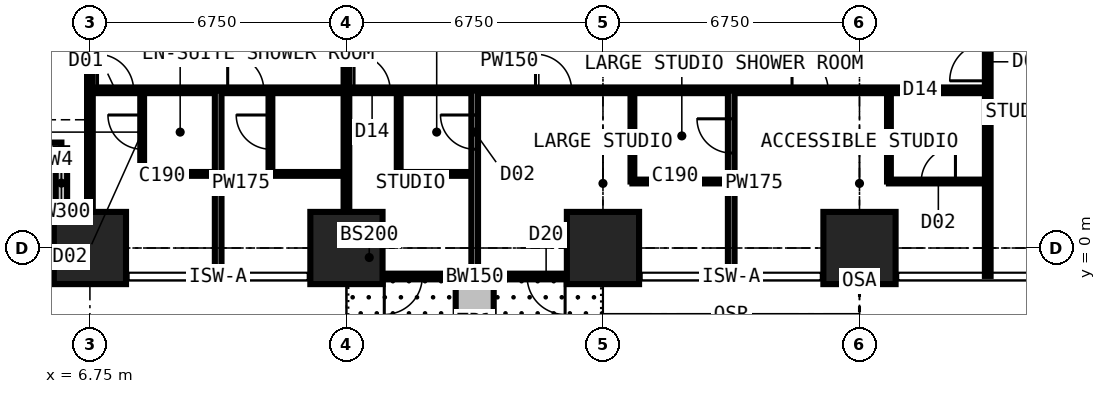
"""IFC4 building model, lengths in metres.
Left out: names, types, materials, properties, quantities, classifications, styles, units other than length and angle.
Written with IfcOpenShell. Run it as: python <this file> out.ifc"""

import sys

from ifc_helpers import new_model, si_unit, direction, frame, frame_2d, origin, origin_2d, place, context, subcontext, project, spatial, rectangle, extrude, element, fill, save


model = new_model("IFC4")
c1 = context("Model", 3, precision=1e-05, world=origin(), true_north=direction((0.0, 1.0)))
c2 = subcontext(c1, "Body", "Model", "MODEL_VIEW")
j1 = project(units=[si_unit("LENGTHUNIT", "METRE"), si_unit("PLANEANGLEUNIT", "RADIAN")], contexts=[c1])
p1 = place(None, origin())
s1 = spatial("IfcSite", under=j1, at=p1, CompositionType="ELEMENT")
p2 = place(p1, origin())
s2 = spatial("IfcBuilding", under=s1, at=p2, CompositionType="ELEMENT")
p3 = place(p2, frame((0.0, 0.0, 25.2)))
s3 = spatial("IfcBuildingStorey", under=s2, at=p3, CompositionType="ELEMENT", Elevation=25.2)
for number, where, z_axis, x_axis in (
    (1, (6.75, 0.0, 0.0), (0.0, 0.0, 1.0), (1.0, 0.0, 0.0)),
    (2, (13.5, 0.0, 0.0), (0.0, 0.0, 1.0), (1.0, 0.0, 0.0)),
    (3, (20.25, 0.0, 0.0), (0.0, 0.0, 1.0), (1.0, 0.0, 0.0)),
    (4, (27.0, 0.0, 0.0), (0.0, 0.0, 1.0), (1.0, 0.0, 0.0)),
):
    element("IfcColumn", number, at=place(p3, frame(where, z_axis=z_axis, x_axis=x_axis)), inside=s3, PredefinedType="COLUMN", context=c2, shape_type="SweptSolid", body=[
        extrude(rectangle(XDim=1.9, YDim=1.9, at=origin_2d()), origin(), (0.0, 0.0, 1.0), 3.6),
    ])
p4 = place(p3, frame((2.625, 2.625, 0.0), z_axis=(0.0, 0.0, 1.0), x_axis=(1.0, 0.0, 0.0)))
e5 = element("IfcWall", 5, at=p4, inside=s3, PredefinedType="SOLIDWALL", context=c2, shape_type="SweptSolid", body=[
    extrude(rectangle(XDim=3.375, YDim=0.3, at=frame_2d((1.688, 0.0))), origin(), (0.0, 0.0, 1.0), 3.375),
])
p5 = place(p4, frame((0.788, 0.0, 0.6)))
e6 = element("IfcOpeningElement", 6, at=p5, cuts=e5, PredefinedType="OPENING", context=c2, shape_type="SweptSolid", body=[
    extrude(rectangle(XDim=1.8, YDim=2.1, at=frame_2d((0.9, 1.05))), frame((0.0, 0.16, 0.0), z_axis=(0.0, -1.0, 0.0), x_axis=(1.0, 0.0, 0.0)), (0.0, 0.0, 1.0), 0.32),
])
p6 = place(p3, frame((6.0, 2.625, 0.0), z_axis=(0.0, 0.0, 1.0), x_axis=(0.0, -1.0, 0.0)))
e7 = element("IfcWall", 7, at=p6, inside=s3, PredefinedType="SOLIDWALL", context=c2, shape_type="SweptSolid", body=[
    extrude(rectangle(XDim=3.375, YDim=0.3, at=frame_2d((1.688, 0.0))), origin(), (0.0, 0.0, 1.0), 3.375),
])
p7 = place(p6, frame((0.317, 0.0, 0.9)))
e8 = element("IfcOpeningElement", 8, at=p7, cuts=e7, PredefinedType="OPENING", context=c2, shape_type="SweptSolid", body=[
    extrude(rectangle(XDim=1.2, YDim=1.8, at=frame_2d((0.6, 0.9))), frame((0.0, 0.16, 0.0), z_axis=(0.0, -1.0, 0.0), x_axis=(1.0, 0.0, 0.0)), (0.0, 0.0, 1.0), 0.32),
])
p8 = place(p3, frame((20.25, -0.75, 0.0), z_axis=(0.0, 0.0, 1.0), x_axis=(-1.0, 0.0, 0.0)))
e9 = element("IfcWall", 9, at=p8, inside=s3, PredefinedType="SOLIDWALL", context=c2, shape_type="SweptSolid", body=[
    extrude(rectangle(XDim=6.75, YDim=0.15, at=frame_2d((3.375, 0.0))), origin(), (0.0, 0.0, 1.0), 3.375),
])
p9 = place(p8, frame((0.996, 0.0, 0.0)))
e10 = element("IfcOpeningElement", 10, at=p9, cuts=e9, PredefinedType="OPENING", context=c2, shape_type="SweptSolid", body=[
    extrude(rectangle(XDim=1.0, YDim=2.2, at=frame_2d((0.5, 1.1))), frame((0.0, 0.085, 0.0), z_axis=(0.0, -1.0, 0.0), x_axis=(1.0, 0.0, 0.0)), (0.0, 0.0, 1.0), 0.17),
])
p10 = place(p8, frame((2.042, 0.0, 0.9)))
e11 = element("IfcOpeningElement", 11, at=p10, cuts=e9, PredefinedType="OPENING", context=c2, shape_type="SweptSolid", body=[
    extrude(rectangle(XDim=1.2, YDim=1.8, at=frame_2d((0.6, 0.9))), frame((0.0, 0.085, 0.0), z_axis=(0.0, -1.0, 0.0), x_axis=(1.0, 0.0, 0.0)), (0.0, 0.0, 1.0), 0.17),
])
p11 = place(p8, frame((4.754, 0.0, 0.0)))
e12 = element("IfcOpeningElement", 12, at=p11, cuts=e9, PredefinedType="OPENING", context=c2, shape_type="SweptSolid", body=[
    extrude(rectangle(XDim=1.0, YDim=2.2, at=frame_2d((0.5, 1.1))), frame((0.0, 0.085, 0.0), z_axis=(0.0, -1.0, 0.0), x_axis=(1.0, 0.0, 0.0)), (0.0, 0.0, 1.0), 0.17),
])
p12 = place(p8, frame((3.508, 0.0, 0.9)))
e13 = element("IfcOpeningElement", 13, at=p12, cuts=e9, PredefinedType="OPENING", context=c2, shape_type="SweptSolid", body=[
    extrude(rectangle(XDim=1.2, YDim=1.8, at=frame_2d((0.6, 0.9))), frame((0.0, 0.085, 0.0), z_axis=(0.0, -1.0, 0.0), x_axis=(1.0, 0.0, 0.0)), (0.0, 0.0, 1.0), 0.17),
])
p13 = place(p3, frame((16.875, -0.85, 0.0), z_axis=(0.0, 0.0, 1.0), x_axis=(0.0, -1.0, 0.0)))
e14 = element("IfcWall", 14, at=p13, inside=s3, PredefinedType="USERDEFINED", context=c2, shape_type="SweptSolid", body=[
    extrude(rectangle(XDim=2.2, YDim=1.0, at=frame_2d((1.1, 0.0))), origin(), (0.0, 0.0, 1.0), 0.9),
])
p14 = place(p3, frame((6.75, -0.734, 0.0), z_axis=(0.0, 0.0, 1.0), x_axis=(0.0, 1.0, 0.0)))
e15 = element("IfcWall", 15, at=p14, inside=s3, PredefinedType="PARTITIONING", context=c2, shape_type="SweptSolid", body=[
    extrude(rectangle(XDim=10.859, YDim=0.15, at=frame_2d((5.429, 0.0))), origin(), (0.0, 0.0, 1.0), 2.877),
])
p15 = place(p3, frame((6.75, 4.15, 0.0), z_axis=(0.0, 0.0, 1.0), x_axis=(1.0, 0.0, 0.0)))
e16 = element("IfcWall", 16, at=p15, inside=s3, PredefinedType="PARTITIONING", context=c2, shape_type="SweptSolid", body=[
    extrude(rectangle(XDim=23.625, YDim=0.15, at=frame_2d((11.812, 0.0))), origin(), (0.0, 0.0, 1.0), 3.375),
])
p16 = place(p15, frame((0.2, 0.0, 0.0)))
e17 = element("IfcOpeningElement", 17, at=p16, cuts=e16, PredefinedType="OPENING", context=c2, shape_type="SweptSolid", body=[
    extrude(rectangle(XDim=0.95, YDim=2.2, at=frame_2d((0.475, 1.1))), frame((0.0, 0.085, 0.0), z_axis=(0.0, -1.0, 0.0), x_axis=(1.0, 0.0, 0.0)), (0.0, 0.0, 1.0), 0.17),
])
p17 = place(p15, frame((3.625, 0.0, 0.0)))
e18 = element("IfcOpeningElement", 18, at=p17, cuts=e16, PredefinedType="OPENING", context=c2, shape_type="SweptSolid", body=[
    extrude(rectangle(XDim=0.95, YDim=2.2, at=frame_2d((0.475, 1.1))), frame((0.0, 0.085, 0.0), z_axis=(0.0, -1.0, 0.0), x_axis=(1.0, 0.0, 0.0)), (0.0, 0.0, 1.0), 0.17),
])
p18 = place(p15, frame((18.475, 0.0, 0.0)))
e19 = element("IfcOpeningElement", 19, at=p18, cuts=e16, PredefinedType="OPENING", context=c2, shape_type="SweptSolid", body=[
    extrude(rectangle(XDim=0.95, YDim=2.2, at=frame_2d((0.475, 1.1))), frame((0.0, 0.085, 0.0), z_axis=(0.0, -1.0, 0.0), x_axis=(1.0, 0.0, 0.0)), (0.0, 0.0, 1.0), 0.17),
])
p19 = place(p15, frame((11.725, 0.0, 0.0)))
e20 = element("IfcOpeningElement", 20, at=p19, cuts=e16, PredefinedType="OPENING", context=c2, shape_type="SweptSolid", body=[
    extrude(rectangle(XDim=0.95, YDim=2.2, at=frame_2d((0.475, 1.1))), frame((0.0, 0.085, 0.0), z_axis=(0.0, -1.0, 0.0), x_axis=(1.0, 0.0, 0.0)), (0.0, 0.0, 1.0), 0.17),
])
p20 = place(p15, frame((6.95, 0.0, 0.0)))
e21 = element("IfcOpeningElement", 21, at=p20, cuts=e16, PredefinedType="OPENING", context=c2, shape_type="SweptSolid", body=[
    extrude(rectangle(XDim=0.95, YDim=2.2, at=frame_2d((0.475, 1.1))), frame((0.0, 0.085, 0.0), z_axis=(0.0, -1.0, 0.0), x_axis=(1.0, 0.0, 0.0)), (0.0, 0.0, 1.0), 0.17),
])
p21 = place(p3, frame((8.125, 1.95, 0.0), z_axis=(0.0, 0.0, 1.0), x_axis=(0.0, 1.0, 0.0)))
e22 = element("IfcWall", 22, at=p21, inside=s3, PredefinedType="PARTITIONING", context=c2, shape_type="SweptSolid", body=[
    extrude(rectangle(XDim=2.2, YDim=0.1, at=frame_2d((1.1, 0.0))), origin(), (0.0, 0.0, 1.0), 3.375),
])
p22 = place(p21, frame((0.65, 0.0, 0.0)))
e23 = element("IfcOpeningElement", 23, at=p22, cuts=e22, PredefinedType="OPENING", context=c2, shape_type="SweptSolid", body=[
    extrude(rectangle(XDim=0.9, YDim=2.2, at=frame_2d((0.45, 1.1))), frame((0.0, 0.06, 0.0), z_axis=(0.0, -1.0, 0.0), x_axis=(1.0, 0.0, 0.0)), (0.0, 0.0, 1.0), 0.12),
])
p23 = place(p3, frame((8.125, 1.95, 0.0), z_axis=(0.0, 0.0, 1.0), x_axis=(1.0, 0.0, 0.0)))
e24 = element("IfcWall", 24, at=p23, inside=s3, PredefinedType="PARTITIONING", context=c2, shape_type="SweptSolid", body=[
    extrude(rectangle(XDim=2.0, YDim=0.1, at=frame_2d((1.0, 0.0))), origin(), (0.0, 0.0, 1.0), 3.375),
])
p24 = place(p3, frame((10.125, -0.734, 0.0), z_axis=(0.0, 0.0, 1.0), x_axis=(0.0, 1.0, 0.0)))
e25 = element("IfcWall", 25, at=p24, inside=s3, PredefinedType="PARTITIONING", context=c2, shape_type="SweptSolid", body=[
    extrude(rectangle(XDim=4.884, YDim=0.175, at=frame_2d((2.442, 0.0))), origin(), (0.0, 0.0, 1.0), 3.375),
])
p25 = place(p3, frame((11.5, 1.95, 0.0), z_axis=(0.0, 0.0, 1.0), x_axis=(0.0, 1.0, 0.0)))
e26 = element("IfcWall", 26, at=p25, inside=s3, PredefinedType="PARTITIONING", context=c2, shape_type="SweptSolid", body=[
    extrude(rectangle(XDim=2.2, YDim=0.1, at=frame_2d((1.1, 0.0))), origin(), (0.0, 0.0, 1.0), 3.375),
])
p26 = place(p25, frame((0.65, 0.0, 0.0)))
e27 = element("IfcOpeningElement", 27, at=p26, cuts=e26, PredefinedType="OPENING", context=c2, shape_type="SweptSolid", body=[
    extrude(rectangle(XDim=0.9, YDim=2.2, at=frame_2d((0.45, 1.1))), frame((0.0, 0.06, 0.0), z_axis=(0.0, -1.0, 0.0), x_axis=(1.0, 0.0, 0.0)), (0.0, 0.0, 1.0), 0.12),
])
p27 = place(p3, frame((11.5, 1.95, 0.0), z_axis=(0.0, 0.0, 1.0), x_axis=(1.0, 0.0, 0.0)))
e28 = element("IfcWall", 28, at=p27, inside=s3, PredefinedType="PARTITIONING", context=c2, shape_type="SweptSolid", body=[
    extrude(rectangle(XDim=2.0, YDim=0.1, at=frame_2d((1.0, 0.0))), origin(), (0.0, 0.0, 1.0), 3.375),
])
p28 = place(p3, frame((13.5, -0.734, 0.0), z_axis=(0.0, 0.0, 1.0), x_axis=(0.0, 1.0, 0.0)))
e29 = element("IfcWall", 29, at=p28, inside=s3, PredefinedType="PARTITIONING", context=c2, shape_type="SweptSolid", body=[
    extrude(rectangle(XDim=12.034, YDim=0.15, at=frame_2d((6.017, 0.0))), origin(), (0.0, 0.0, 1.0), 2.877),
])
p29 = place(p3, frame((14.875, 1.95, 0.0), z_axis=(0.0, 0.0, 1.0), x_axis=(0.0, 1.0, 0.0)))
e30 = element("IfcWall", 30, at=p29, inside=s3, PredefinedType="PARTITIONING", context=c2, shape_type="SweptSolid", body=[
    extrude(rectangle(XDim=2.2, YDim=0.1, at=frame_2d((1.1, 0.0))), origin(), (0.0, 0.0, 1.0), 3.375),
])
p30 = place(p3, frame((14.875, 1.95, 0.0), z_axis=(0.0, 0.0, 1.0), x_axis=(1.0, 0.0, 0.0)))
e31 = element("IfcWall", 31, at=p30, inside=s3, PredefinedType="PARTITIONING", context=c2, shape_type="SweptSolid", body=[
    extrude(rectangle(XDim=2.0, YDim=0.1, at=frame_2d((1.0, 0.0))), origin(), (0.0, 0.0, 1.0), 3.375),
])
p31 = place(p3, frame((16.875, -0.734, 0.0), z_axis=(0.0, 0.0, 1.0), x_axis=(0.0, 1.0, 0.0)))
e32 = element("IfcWall", 32, at=p31, inside=s3, PredefinedType="PARTITIONING", context=c2, shape_type="SweptSolid", body=[
    extrude(rectangle(XDim=4.884, YDim=0.175, at=frame_2d((2.442, 0.0))), origin(), (0.0, 0.0, 1.0), 3.375),
])
p32 = place(p31, frame((3.334, 0.0, 0.0)))
e33 = element("IfcOpeningElement", 33, at=p32, cuts=e32, PredefinedType="OPENING", context=c2, shape_type="SweptSolid", body=[
    extrude(rectangle(XDim=0.9, YDim=2.2, at=frame_2d((0.45, 1.1))), frame((0.0, 0.097, 0.0), z_axis=(0.0, -1.0, 0.0), x_axis=(1.0, 0.0, 0.0)), (0.0, 0.0, 1.0), 0.195),
])
p33 = place(p3, frame((21.025, 1.75, 0.0), z_axis=(0.0, 0.0, 1.0), x_axis=(0.0, 1.0, 0.0)))
e34 = element("IfcWall", 34, at=p33, inside=s3, PredefinedType="PARTITIONING", context=c2, shape_type="SweptSolid", body=[
    extrude(rectangle(XDim=2.4, YDim=0.1, at=frame_2d((1.2, 0.0))), origin(), (0.0, 0.0, 1.0), 3.375),
])
p34 = place(p3, frame((21.025, 1.75, 0.0), z_axis=(0.0, 0.0, 1.0), x_axis=(1.0, 0.0, 0.0)))
e35 = element("IfcWall", 35, at=p34, inside=s3, PredefinedType="PARTITIONING", context=c2, shape_type="SweptSolid", body=[
    extrude(rectangle(XDim=2.6, YDim=0.1, at=frame_2d((1.3, 0.0))), origin(), (0.0, 0.0, 1.0), 3.375),
])
p35 = place(p3, frame((23.625, -0.734, 0.0), z_axis=(0.0, 0.0, 1.0), x_axis=(0.0, 1.0, 0.0)))
e36 = element("IfcWall", 36, at=p35, inside=s3, PredefinedType="PARTITIONING", context=c2, shape_type="SweptSolid", body=[
    extrude(rectangle(XDim=4.884, YDim=0.175, at=frame_2d((2.442, 0.0))), origin(), (0.0, 0.0, 1.0), 3.375),
])
p36 = place(p35, frame((3.234, 0.0, 0.0)))
e37 = element("IfcOpeningElement", 37, at=p36, cuts=e36, PredefinedType="OPENING", context=c2, shape_type="SweptSolid", body=[
    extrude(rectangle(XDim=0.9, YDim=2.2, at=frame_2d((0.45, 1.1))), frame((0.0, 0.097, 0.0), z_axis=(0.0, -1.0, 0.0), x_axis=(1.0, 0.0, 0.0)), (0.0, 0.0, 1.0), 0.195),
])
p37 = place(p3, frame((27.775, 1.75, 0.0), z_axis=(0.0, 0.0, 1.0), x_axis=(0.0, 1.0, 0.0)))
e38 = element("IfcWall", 38, at=p37, inside=s3, PredefinedType="PARTITIONING", context=c2, shape_type="SweptSolid", body=[
    extrude(rectangle(XDim=2.4, YDim=0.1, at=frame_2d((1.2, 0.0))), origin(), (0.0, 0.0, 1.0), 3.375),
])
p38 = place(p3, frame((27.775, 1.75, 0.0), z_axis=(0.0, 0.0, 1.0), x_axis=(1.0, 0.0, 0.0)))
e39 = element("IfcWall", 39, at=p38, inside=s3, PredefinedType="PARTITIONING", context=c2, shape_type="SweptSolid", body=[
    extrude(rectangle(XDim=2.6, YDim=0.1, at=frame_2d((1.3, 0.0))), origin(), (0.0, 0.0, 1.0), 3.375),
])
p39 = place(p38, frame((0.85, 0.0, 0.0)))
e40 = element("IfcOpeningElement", 40, at=p39, cuts=e39, PredefinedType="OPENING", context=c2, shape_type="SweptSolid", body=[
    extrude(rectangle(XDim=0.9, YDim=2.2, at=frame_2d((0.45, 1.1))), frame((0.0, 0.06, 0.0), z_axis=(0.0, -1.0, 0.0), x_axis=(1.0, 0.0, 0.0)), (0.0, 0.0, 1.0), 0.12),
])
p40 = place(p3, frame((30.375, -0.734, 0.0), z_axis=(0.0, 0.0, 1.0), x_axis=(0.0, 1.0, 0.0)))
e41 = element("IfcWall", 41, at=p40, inside=s3, PredefinedType="PARTITIONING", context=c2, shape_type="SweptSolid", body=[
    extrude(rectangle(XDim=12.034, YDim=0.15, at=frame_2d((6.017, 0.0))), origin(), (0.0, 0.0, 1.0), 3.375),
])
p41 = place(p40, frame((5.134, 0.0, 0.0)))
e42 = element("IfcOpeningElement", 42, at=p41, cuts=e41, PredefinedType="OPENING", context=c2, shape_type="SweptSolid", body=[
    extrude(rectangle(XDim=1.0, YDim=2.2, at=frame_2d((0.5, 1.1))), frame((0.0, 0.085, 0.0), z_axis=(0.0, -1.0, 0.0), x_axis=(1.0, 0.0, 0.0)), (0.0, 0.0, 1.0), 0.17),
])
p42 = place(p7, origin())
e43 = element("IfcWindow", 43, at=p42, inside=s3, PartitioningType="SINGLE_PANEL", PredefinedType="WINDOW", context=c2, shape_type="SweptSolid", body=[
    extrude(rectangle(XDim=1.2, YDim=1.8, at=frame_2d((0.6, 0.9))), frame((0.0, 0.03, 0.0), z_axis=(0.0, -1.0, 0.0), x_axis=(1.0, 0.0, 0.0)), (0.0, 0.0, 1.0), 0.06),
])
fill(e8, e43)
p43 = place(p9, origin())
e44 = element("IfcDoor", 44, at=p43, inside=s3, OperationType="SINGLE_SWING_LEFT", PredefinedType="DOOR", context=c2, shape_type="SweptSolid", body=[
    extrude(rectangle(XDim=1.0, YDim=2.2, at=frame_2d((0.5, 1.1))), frame((0.0, 0.025, 0.0), z_axis=(0.0, -1.0, 0.0), x_axis=(1.0, 0.0, 0.0)), (0.0, 0.0, 1.0), 0.05),
])
fill(e10, e44)
p44 = place(p10, origin())
e45 = element("IfcWindow", 45, at=p44, inside=s3, PartitioningType="SINGLE_PANEL", PredefinedType="WINDOW", context=c2, shape_type="SweptSolid", body=[
    extrude(rectangle(XDim=1.2, YDim=1.8, at=frame_2d((0.6, 0.9))), frame((0.0, 0.03, 0.0), z_axis=(0.0, -1.0, 0.0), x_axis=(1.0, 0.0, 0.0)), (0.0, 0.0, 1.0), 0.06),
])
fill(e11, e45)
p45 = place(p11, origin())
e46 = element("IfcDoor", 46, at=p45, inside=s3, OperationType="SINGLE_SWING_RIGHT", PredefinedType="DOOR", context=c2, shape_type="SweptSolid", body=[
    extrude(rectangle(XDim=1.0, YDim=2.2, at=frame_2d((0.5, 1.1))), frame((0.0, 0.025, 0.0), z_axis=(0.0, -1.0, 0.0), x_axis=(1.0, 0.0, 0.0)), (0.0, 0.0, 1.0), 0.05),
])
fill(e12, e46)
p46 = place(p12, origin())
e47 = element("IfcWindow", 47, at=p46, inside=s3, PartitioningType="SINGLE_PANEL", PredefinedType="WINDOW", context=c2, shape_type="SweptSolid", body=[
    extrude(rectangle(XDim=1.2, YDim=1.8, at=frame_2d((0.6, 0.9))), frame((0.0, 0.03, 0.0), z_axis=(0.0, -1.0, 0.0), x_axis=(1.0, 0.0, 0.0)), (0.0, 0.0, 1.0), 0.06),
])
fill(e13, e47)
p47 = place(p16, origin())
e48 = element("IfcDoor", 48, at=p47, inside=s3, OperationType="SINGLE_SWING_LEFT", PredefinedType="DOOR", context=c2, shape_type="SweptSolid", body=[
    extrude(rectangle(XDim=0.95, YDim=2.2, at=frame_2d((0.475, 1.1))), frame((0.0, 0.025, 0.0), z_axis=(0.0, -1.0, 0.0), x_axis=(1.0, 0.0, 0.0)), (0.0, 0.0, 1.0), 0.05),
])
fill(e17, e48)
p48 = place(p22, origin())
e49 = element("IfcDoor", 49, at=p48, inside=s3, OperationType="SINGLE_SWING_RIGHT", PredefinedType="DOOR", context=c2, shape_type="SweptSolid", body=[
    extrude(rectangle(XDim=0.9, YDim=2.2, at=frame_2d((0.45, 1.1))), frame((0.0, 0.025, 0.0), z_axis=(0.0, -1.0, 0.0), x_axis=(1.0, 0.0, 0.0)), (0.0, 0.0, 1.0), 0.05),
])
fill(e23, e49)
p49 = place(p17, origin())
e50 = element("IfcDoor", 50, at=p49, inside=s3, OperationType="SINGLE_SWING_LEFT", PredefinedType="DOOR", context=c2, shape_type="SweptSolid", body=[
    extrude(rectangle(XDim=0.95, YDim=2.2, at=frame_2d((0.475, 1.1))), frame((0.0, 0.025, 0.0), z_axis=(0.0, -1.0, 0.0), x_axis=(1.0, 0.0, 0.0)), (0.0, 0.0, 1.0), 0.05),
])
fill(e18, e50)
p50 = place(p26, origin())
e51 = element("IfcDoor", 51, at=p50, inside=s3, OperationType="SINGLE_SWING_RIGHT", PredefinedType="DOOR", context=c2, shape_type="SweptSolid", body=[
    extrude(rectangle(XDim=0.9, YDim=2.2, at=frame_2d((0.45, 1.1))), frame((0.0, 0.025, 0.0), z_axis=(0.0, -1.0, 0.0), x_axis=(1.0, 0.0, 0.0)), (0.0, 0.0, 1.0), 0.05),
])
fill(e27, e51)
p51 = place(p18, origin())
e52 = element("IfcDoor", 52, at=p51, inside=s3, OperationType="SINGLE_SWING_LEFT", PredefinedType="DOOR", context=c2, shape_type="SweptSolid", body=[
    extrude(rectangle(XDim=0.95, YDim=2.2, at=frame_2d((0.475, 1.1))), frame((0.0, 0.025, 0.0), z_axis=(0.0, -1.0, 0.0), x_axis=(1.0, 0.0, 0.0)), (0.0, 0.0, 1.0), 0.05),
])
fill(e19, e52)
p52 = place(p39, origin())
e53 = element("IfcDoor", 53, at=p52, inside=s3, OperationType="SINGLE_SWING_RIGHT", PredefinedType="DOOR", context=c2, shape_type="SweptSolid", body=[
    extrude(rectangle(XDim=0.9, YDim=2.2, at=frame_2d((0.45, 1.1))), frame((0.0, 0.025, 0.0), z_axis=(0.0, -1.0, 0.0), x_axis=(1.0, 0.0, 0.0)), (0.0, 0.0, 1.0), 0.05),
])
fill(e40, e53)
p53 = place(p19, origin())
e54 = element("IfcDoor", 54, at=p53, inside=s3, OperationType="SINGLE_SWING_LEFT", PredefinedType="DOOR", context=c2, shape_type="SweptSolid", body=[
    extrude(rectangle(XDim=0.95, YDim=2.2, at=frame_2d((0.475, 1.1))), frame((0.0, 0.025, 0.0), z_axis=(0.0, -1.0, 0.0), x_axis=(1.0, 0.0, 0.0)), (0.0, 0.0, 1.0), 0.05),
])
fill(e20, e54)
p54 = place(p36, origin())
e55 = element("IfcDoor", 55, at=p54, inside=s3, OperationType="SINGLE_SWING_RIGHT", PredefinedType="DOOR", context=c2, shape_type="SweptSolid", body=[
    extrude(rectangle(XDim=0.9, YDim=2.2, at=frame_2d((0.45, 1.1))), frame((0.0, 0.025, 0.0), z_axis=(0.0, -1.0, 0.0), x_axis=(1.0, 0.0, 0.0)), (0.0, 0.0, 1.0), 0.05),
])
fill(e37, e55)
p55 = place(p20, origin())
e56 = element("IfcDoor", 56, at=p55, inside=s3, OperationType="SINGLE_SWING_LEFT", PredefinedType="DOOR", context=c2, shape_type="SweptSolid", body=[
    extrude(rectangle(XDim=0.95, YDim=2.2, at=frame_2d((0.475, 1.1))), frame((0.0, 0.025, 0.0), z_axis=(0.0, -1.0, 0.0), x_axis=(1.0, 0.0, 0.0)), (0.0, 0.0, 1.0), 0.05),
])
fill(e21, e56)
p56 = place(p32, origin())
e57 = element("IfcDoor", 57, at=p56, inside=s3, OperationType="SINGLE_SWING_RIGHT", PredefinedType="DOOR", context=c2, shape_type="SweptSolid", body=[
    extrude(rectangle(XDim=0.9, YDim=2.2, at=frame_2d((0.45, 1.1))), frame((0.0, 0.025, 0.0), z_axis=(0.0, -1.0, 0.0), x_axis=(1.0, 0.0, 0.0)), (0.0, 0.0, 1.0), 0.05),
])
fill(e33, e57)
p57 = place(p41, origin())
e58 = element("IfcDoor", 58, at=p57, inside=s3, OperationType="SINGLE_SWING_LEFT", PredefinedType="DOOR", context=c2, shape_type="SweptSolid", body=[
    extrude(rectangle(XDim=1.0, YDim=2.2, at=frame_2d((0.5, 1.1))), frame((0.0, 0.025, 0.0), z_axis=(0.0, -1.0, 0.0), x_axis=(1.0, 0.0, 0.0)), (0.0, 0.0, 1.0), 0.05),
])
fill(e42, e58)
save(model, sys.argv[1])
